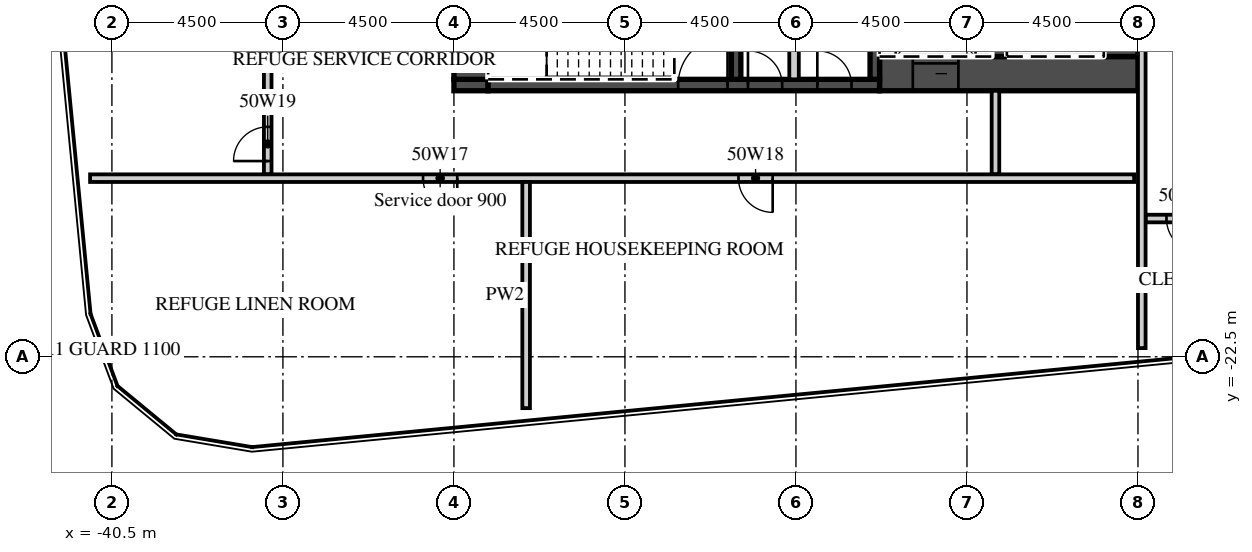
"""IFC4 building model, lengths in metres.
Left out: names, types, materials, properties, quantities, classifications, styles, units other than length and angle.
Written with IfcOpenShell. Run it as: python <this file> out.ifc"""

import sys

from ifc_helpers import new_model, si_unit, direction, frame, frame_2d, origin, place, context, subcontext, project, spatial, rectangle, extrude, element, fill, save


model = new_model("IFC4")
c1 = context("Model", 3, precision=1e-05, world=origin(), true_north=direction((0.0, 1.0)))
c2 = subcontext(c1, "Body", "Model", "MODEL_VIEW")
j1 = project(units=[si_unit("LENGTHUNIT", "METRE"), si_unit("PLANEANGLEUNIT", "RADIAN")], contexts=[c1])
p1 = place(None, origin())
s1 = spatial("IfcSite", under=j1, at=p1, CompositionType="ELEMENT")
p2 = place(p1, origin())
s2 = spatial("IfcBuilding", under=s1, at=p2, CompositionType="ELEMENT")
p3 = place(p2, frame((0.0, 0.0, 206.5)))
s3 = spatial("IfcBuildingStorey", under=s2, at=p3, CompositionType="ELEMENT", Elevation=206.5)
p4 = place(p3, frame((-20.3, -15.05, 0.0), z_axis=(0.0, 0.0, 1.0), x_axis=(1.0, 0.0, 0.0)))
e1 = element("IfcWall", 1, at=p4, inside=s3, PredefinedType="SHEAR", context=c2, shape_type="SweptSolid", body=[
    extrude(rectangle(XDim=6.8, YDim=0.9, at=frame_2d((3.4, 0.0))), origin(), (0.0, 0.0, 1.0), 4.2),
])
p5 = place(p4, frame((0.875, 0.0, 0.0)))
e2 = element("IfcOpeningElement", 2, at=p5, cuts=e1, PredefinedType="OPENING", context=c2, shape_type="SweptSolid", body=[
    extrude(rectangle(XDim=1.2, YDim=2.1, at=frame_2d((0.6, 1.05))), frame((0.0, 0.46, 0.0), z_axis=(0.0, -1.0, 0.0), x_axis=(1.0, 0.0, 0.0)), (0.0, 0.0, 1.0), 0.92),
])
p6 = place(p3, frame((-31.5, -15.35, 0.0), z_axis=(0.0, 0.0, 1.0), x_axis=(1.0, 0.0, 0.0)))
e3 = element("IfcWall", 3, at=p6, inside=s3, PredefinedType="SHEAR", context=c2, shape_type="SweptSolid", body=[
    extrude(rectangle(XDim=0.9, YDim=0.3, at=frame_2d((0.45, 0.0))), origin(), (0.0, 0.0, 1.0), 4.2),
])
p7 = place(p3, frame((-30.6, -15.35, 0.0), z_axis=(0.0, 0.0, 1.0), x_axis=(1.0, 0.0, 0.0)))
e4 = element("IfcWall", 4, at=p7, inside=s3, PredefinedType="SHEAR", context=c2, shape_type="SweptSolid", body=[
    extrude(rectangle(XDim=10.3, YDim=0.3, at=frame_2d((5.15, 0.0))), origin(), (0.0, 0.0, 1.0), 4.2),
])
p8 = place(p7, frame((5.0, 0.0, 0.0)))
e5 = element("IfcOpeningElement", 5, at=p8, cuts=e4, PredefinedType="OPENING", context=c2, shape_type="SweptSolid", body=[
    extrude(rectangle(XDim=1.3, YDim=2.1, at=frame_2d((0.65, 1.05))), frame((0.0, 0.16, 0.0), z_axis=(0.0, -1.0, 0.0), x_axis=(1.0, 0.0, 0.0)), (0.0, 0.0, 1.0), 0.32),
])
p9 = place(p7, frame((6.837, 0.0, 0.0)))
e6 = element("IfcOpeningElement", 6, at=p9, cuts=e4, PredefinedType="OPENING", context=c2, shape_type="SweptSolid", body=[
    extrude(rectangle(XDim=0.9, YDim=2.1, at=frame_2d((0.45, 1.05))), frame((0.0, 0.16, 0.0), z_axis=(0.0, -1.0, 0.0), x_axis=(1.0, 0.0, 0.0)), (0.0, 0.0, 1.0), 0.32),
])
p10 = place(p7, frame((8.663, 0.0, 0.0)))
e7 = element("IfcOpeningElement", 7, at=p10, cuts=e4, PredefinedType="OPENING", context=c2, shape_type="SweptSolid", body=[
    extrude(rectangle(XDim=0.9, YDim=2.1, at=frame_2d((0.45, 1.05))), frame((0.0, 0.16, 0.0), z_axis=(0.0, -1.0, 0.0), x_axis=(1.0, 0.0, 0.0)), (0.0, 0.0, 1.0), 0.32),
])
p11 = place(p3, frame((-31.05, -15.2, 0.0), z_axis=(0.0, 0.0, 1.0), x_axis=(0.0, 1.0, 0.0)))
e8 = element("IfcWall", 8, at=p11, inside=s3, PredefinedType="SHEAR", context=c2, shape_type="SweptSolid", body=[
    extrude(rectangle(XDim=12.8, YDim=0.9, at=frame_2d((6.4, 0.0))), origin(), (0.0, 0.0, 1.0), 4.2),
])
p12 = place(p11, frame((11.5, 0.0, 0.0)))
e9 = element("IfcOpeningElement", 9, at=p12, cuts=e8, PredefinedType="OPENING", context=c2, shape_type="SweptSolid", body=[
    extrude(rectangle(XDim=1.1, YDim=2.1, at=frame_2d((0.55, 1.05))), frame((0.0, 0.46, 0.0), z_axis=(0.0, -1.0, 0.0), x_axis=(1.0, 0.0, 0.0)), (0.0, 0.0, 1.0), 0.92),
])
p13 = place(p3, frame((-13.95, -14.6, 0.0), z_axis=(0.0, 0.0, 1.0), x_axis=(0.0, 1.0, 0.0)))
e10 = element("IfcWall", 10, at=p13, inside=s3, PredefinedType="SHEAR", context=c2, shape_type="SweptSolid", body=[
    extrude(rectangle(XDim=12.2, YDim=0.9, at=frame_2d((6.1, 0.0))), origin(), (0.0, 0.0, 1.0), 4.2),
])
p14 = place(p3, frame((-17.15, -14.6, 0.0), z_axis=(0.0, 0.0, 1.0), x_axis=(0.0, 1.0, 0.0)))
e11 = element("IfcWall", 11, at=p14, inside=s3, PredefinedType="SHEAR", context=c2, shape_type="SweptSolid", body=[
    extrude(rectangle(XDim=5.8, YDim=0.4, at=frame_2d((2.9, 0.0))), origin(), (0.0, 0.0, 1.0), 4.2),
])
for number, where, z_axis, x_axis in (
    (12, (-20.425, -15.2, 0.0), (0.0, 0.0, 1.0), (0.0, 1.0, 0.0)),
    (13, (-24.075, -15.2, 0.0), (0.0, 0.0, 1.0), (0.0, 1.0, 0.0)),
):
    element("IfcWall", number, at=place(p3, frame(where, z_axis=z_axis, x_axis=x_axis)), inside=s3, PredefinedType="SHEAR", context=c2, shape_type="SweptSolid", body=[
        extrude(rectangle(XDim=3.25, YDim=0.25, at=frame_2d((1.625, 0.0))), origin(), (0.0, 0.0, 1.0), 4.2),
    ])
p15 = place(p3, frame((-22.55, -15.2, 0.0), z_axis=(0.0, 0.0, 1.0), x_axis=(0.0, 1.0, 0.0)))
e14 = element("IfcWall", 14, at=p15, inside=s3, PredefinedType="PARTITIONING", context=c2, shape_type="SweptSolid", body=[
    extrude(rectangle(XDim=3.25, YDim=0.25, at=frame_2d((1.625, 0.0))), origin(), (0.0, 0.0, 1.0), 4.2),
])
p16 = place(p3, frame((-17.25, -17.7, 0.0), z_axis=(0.0, 0.0, 1.0), x_axis=(0.0, 1.0, 0.0)))
e15 = element("IfcWall", 15, at=p16, inside=s3, PredefinedType="PARTITIONING", context=c2, shape_type="SweptSolid", body=[
    extrude(rectangle(XDim=2.2, YDim=0.2, at=frame_2d((1.1, 0.0))), origin(), (0.0, 0.0, 1.0), 4.2),
])
p17 = place(p3, frame((-36.4, -17.7, 0.0), z_axis=(0.0, 0.0, 1.0), x_axis=(0.0, 1.0, 0.0)))
e16 = element("IfcWall", 16, at=p17, inside=s3, PredefinedType="PARTITIONING", context=c2, shape_type="SweptSolid", body=[
    extrude(rectangle(XDim=15.95, YDim=0.2, at=frame_2d((7.975, 0.0))), origin(), (0.0, 0.0, 1.0), 4.2),
])
p18 = place(p17, frame((0.35, 0.0, 0.0)))
e17 = element("IfcOpeningElement", 17, at=p18, cuts=e16, PredefinedType="OPENING", context=c2, shape_type="SweptSolid", body=[
    extrude(rectangle(XDim=0.9, YDim=2.1, at=frame_2d((0.45, 1.05))), frame((0.0, 0.11, 0.0), z_axis=(0.0, -1.0, 0.0), x_axis=(1.0, 0.0, 0.0)), (0.0, 0.0, 1.0), 0.22),
])
p19 = place(p3, frame((-41.074, -17.8, 0.0), z_axis=(0.0, 0.0, 1.0), x_axis=(1.0, 0.0, 0.0)))
e18 = element("IfcWall", 18, at=p19, inside=s3, PredefinedType="PARTITIONING", context=c2, shape_type="SweptSolid", body=[
    extrude(rectangle(XDim=27.474, YDim=0.2, at=frame_2d((13.737, 0.0))), origin(), (0.0, 0.0, 1.0), 4.2),
])
p20 = place(p19, frame((8.762, 0.0, 0.0)))
e19 = element("IfcOpeningElement", 19, at=p20, cuts=e18, PredefinedType="OPENING", context=c2, shape_type="SweptSolid", body=[
    extrude(rectangle(XDim=0.9, YDim=2.1, at=frame_2d((0.45, 1.05))), frame((0.0, 0.11, 0.0), z_axis=(0.0, -1.0, 0.0), x_axis=(1.0, 0.0, 0.0)), (0.0, 0.0, 1.0), 0.22),
])
p21 = place(p19, frame((17.062, 0.0, 0.0)))
e20 = element("IfcOpeningElement", 20, at=p21, cuts=e18, PredefinedType="OPENING", context=c2, shape_type="SweptSolid", body=[
    extrude(rectangle(XDim=0.9, YDim=2.1, at=frame_2d((0.45, 1.05))), frame((0.0, 0.11, 0.0), z_axis=(0.0, -1.0, 0.0), x_axis=(1.0, 0.0, 0.0)), (0.0, 0.0, 1.0), 0.22),
])
p22 = place(p3, frame((-29.6, -23.852, 0.0), z_axis=(0.0, 0.0, 1.0), x_axis=(0.0, 1.0, 0.0)))
e21 = element("IfcWall", 21, at=p22, inside=s3, PredefinedType="PARTITIONING", context=c2, shape_type="SweptSolid", body=[
    extrude(rectangle(XDim=5.952, YDim=0.2, at=frame_2d((2.976, 0.0))), origin(), (0.0, 0.0, 1.0), 4.2),
])
p23 = place(p3, frame((-13.3, -18.862, 0.0), z_axis=(0.0, 0.0, 1.0), x_axis=(1.0, 0.0, 0.0)))
e22 = element("IfcWall", 22, at=p23, inside=s3, PredefinedType="PARTITIONING", context=c2, shape_type="SweptSolid", body=[
    extrude(rectangle(XDim=8.7, YDim=0.2, at=frame_2d((4.35, 0.0))), origin(), (0.0, 0.0, 1.0), 4.2),
])
p24 = place(p23, frame((0.55, 0.0, 0.0)))
e23 = element("IfcOpeningElement", 23, at=p24, cuts=e22, PredefinedType="OPENING", context=c2, shape_type="SweptSolid", body=[
    extrude(rectangle(XDim=0.9, YDim=2.1, at=frame_2d((0.45, 1.05))), frame((0.0, 0.11, 0.0), z_axis=(0.0, -1.0, 0.0), x_axis=(1.0, 0.0, 0.0)), (0.0, 0.0, 1.0), 0.22),
])
p25 = place(p3, frame((-13.4, -22.271, 0.0), z_axis=(0.0, 0.0, 1.0), x_axis=(0.0, 1.0, 0.0)))
e24 = element("IfcWall", 24, at=p25, inside=s3, PredefinedType="PARTITIONING", context=c2, shape_type="SweptSolid", body=[
    extrude(rectangle(XDim=20.671, YDim=0.2, at=frame_2d((10.336, 0.0))), origin(), (0.0, 0.0, 1.0), 4.2),
])
p26 = place(p5, origin())
e25 = element("IfcDoor", 25, at=p26, inside=s3, OperationType="SLIDING_TO_LEFT", PredefinedType="DOOR", context=c2, shape_type="SweptSolid", body=[
    extrude(rectangle(XDim=1.2, YDim=2.1, at=frame_2d((0.6, 1.05))), frame((0.0, 0.025, 0.0), z_axis=(0.0, -1.0, 0.0), x_axis=(1.0, 0.0, 0.0)), (0.0, 0.0, 1.0), 0.05),
])
fill(e2, e25)
p27 = place(p8, origin())
e26 = element("IfcDoor", 26, at=p27, inside=s3, OperationType="SINGLE_SWING_RIGHT", PredefinedType="DOOR", context=c2, shape_type="SweptSolid", body=[
    extrude(rectangle(XDim=1.3, YDim=2.1, at=frame_2d((0.65, 1.05))), frame((0.0, 0.025, 0.0), z_axis=(0.0, -1.0, 0.0), x_axis=(1.0, 0.0, 0.0)), (0.0, 0.0, 1.0), 0.05),
])
fill(e5, e26)
p28 = place(p9, origin())
e27 = element("IfcDoor", 27, at=p28, inside=s3, OperationType="SINGLE_SWING_LEFT", PredefinedType="DOOR", context=c2, shape_type="SweptSolid", body=[
    extrude(rectangle(XDim=0.9, YDim=2.1, at=frame_2d((0.45, 1.05))), frame((0.0, 0.025, 0.0), z_axis=(0.0, -1.0, 0.0), x_axis=(1.0, 0.0, 0.0)), (0.0, 0.0, 1.0), 0.05),
])
fill(e6, e27)
p29 = place(p10, origin())
e28 = element("IfcDoor", 28, at=p29, inside=s3, OperationType="SINGLE_SWING_LEFT", PredefinedType="DOOR", context=c2, shape_type="SweptSolid", body=[
    extrude(rectangle(XDim=0.9, YDim=2.1, at=frame_2d((0.45, 1.05))), frame((0.0, 0.025, 0.0), z_axis=(0.0, -1.0, 0.0), x_axis=(1.0, 0.0, 0.0)), (0.0, 0.0, 1.0), 0.05),
])
fill(e7, e28)
p30 = place(p20, origin())
e29 = element("IfcDoor", 29, at=p30, inside=s3, OperationType="SINGLE_SWING_RIGHT", PredefinedType="DOOR", context=c2, shape_type="SweptSolid", body=[
    extrude(rectangle(XDim=0.9, YDim=2.1, at=frame_2d((0.45, 1.05))), frame((0.0, 0.025, 0.0), z_axis=(0.0, -1.0, 0.0), x_axis=(1.0, 0.0, 0.0)), (0.0, 0.0, 1.0), 0.05),
])
fill(e19, e29)
p31 = place(p21, origin())
e30 = element("IfcDoor", 30, at=p31, inside=s3, OperationType="SINGLE_SWING_RIGHT", PredefinedType="DOOR", context=c2, shape_type="SweptSolid", body=[
    extrude(rectangle(XDim=0.9, YDim=2.1, at=frame_2d((0.45, 1.05))), frame((0.0, 0.025, 0.0), z_axis=(0.0, -1.0, 0.0), x_axis=(1.0, 0.0, 0.0)), (0.0, 0.0, 1.0), 0.05),
])
fill(e20, e30)
p32 = place(p18, origin())
e31 = element("IfcDoor", 31, at=p32, inside=s3, OperationType="SINGLE_SWING_LEFT", PredefinedType="DOOR", context=c2, shape_type="SweptSolid", body=[
    extrude(rectangle(XDim=0.9, YDim=2.1, at=frame_2d((0.45, 1.05))), frame((0.0, 0.025, 0.0), z_axis=(0.0, -1.0, 0.0), x_axis=(1.0, 0.0, 0.0)), (0.0, 0.0, 1.0), 0.05),
])
fill(e17, e31)
p33 = place(p24, origin())
e32 = element("IfcDoor", 32, at=p33, inside=s3, OperationType="SINGLE_SWING_RIGHT", PredefinedType="DOOR", context=c2, shape_type="SweptSolid", body=[
    extrude(rectangle(XDim=0.9, YDim=2.1, at=frame_2d((0.45, 1.05))), frame((0.0, 0.025, 0.0), z_axis=(0.0, -1.0, 0.0), x_axis=(1.0, 0.0, 0.0)), (0.0, 0.0, 1.0), 0.05),
])
fill(e23, e32)
save(model, sys.argv[1])
